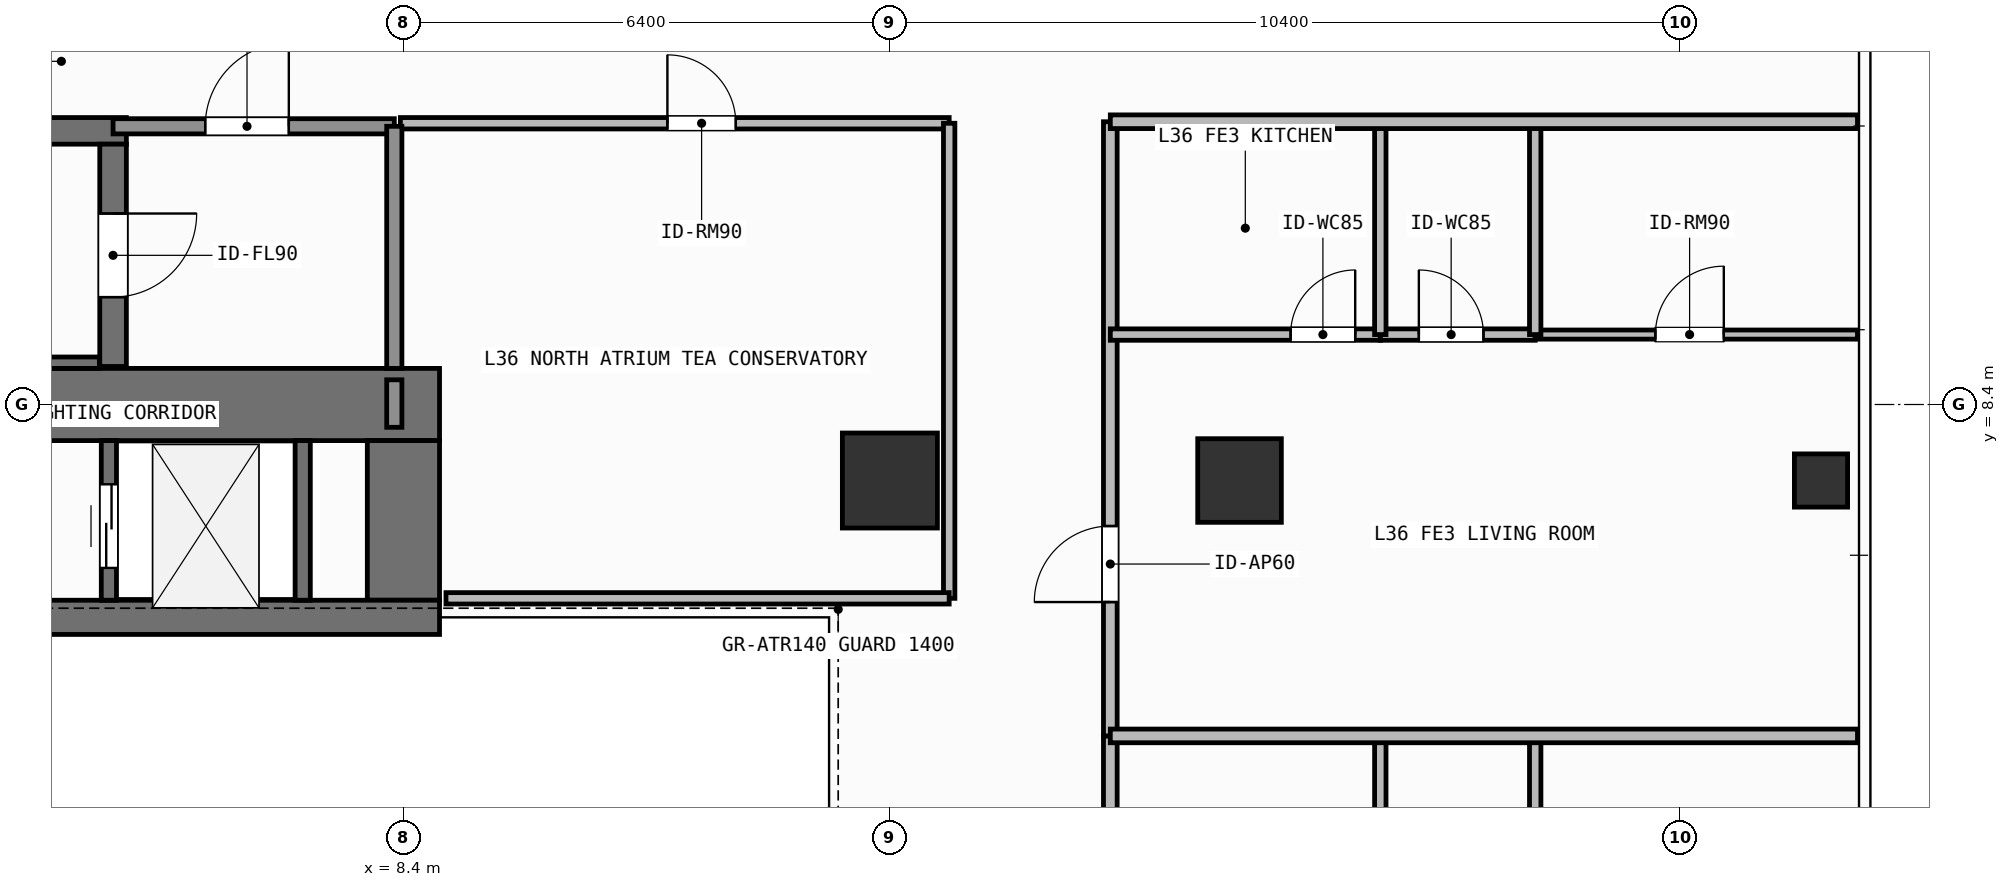
"""IFC4 building model, lengths in metres.
Left out: names, types, materials, properties, quantities, classifications, styles, units other than length and angle.
Written with IfcOpenShell. Run it as: python <this file> out.ifc"""

import sys

from ifc_helpers import new_model, si_unit, direction, frame, frame_2d, origin, origin_2d, place, context, subcontext, project, spatial, rectangle, hollow_rectangle, extrude, element, fill, save


model = new_model("IFC4")
c1 = context("Model", 3, precision=1e-05, world=origin(), true_north=direction((0.0, 1.0)))
c2 = subcontext(c1, "Body", "Model", "MODEL_VIEW")
j1 = project(units=[si_unit("LENGTHUNIT", "METRE"), si_unit("PLANEANGLEUNIT", "RADIAN")], contexts=[c1])
p1 = place(None, origin())
s1 = spatial("IfcSite", under=j1, at=p1, CompositionType="ELEMENT")
p2 = place(p1, origin())
s2 = spatial("IfcBuilding", under=s1, at=p2, CompositionType="ELEMENT")
p3 = place(p2, frame((0.0, 0.0, 144.6)))
s3 = spatial("IfcBuildingStorey", under=s2, at=p3, CompositionType="ELEMENT", Elevation=144.6)
p4 = place(p3, frame((-7.55, 8.4, 0.0), z_axis=(0.0, 0.0, 1.0), x_axis=(1.0, 0.0, 0.0)))
e1 = element("IfcWall", 1, at=p4, inside=s3, PredefinedType="SHEAR", context=c2, shape_type="SweptSolid", body=[
    extrude(rectangle(XDim=16.425, YDim=0.95, at=frame_2d((8.212, 0.0))), origin(), (0.0, 0.0, 1.0), 3.9),
])
p5 = place(p3, frame((8.4, 5.825, 0.0), z_axis=(0.0, 0.0, 1.0), x_axis=(0.0, 1.0, 0.0)))
e2 = element("IfcWall", 2, at=p5, inside=s3, PredefinedType="SHEAR", context=c2, shape_type="SweptSolid", body=[
    extrude(rectangle(XDim=2.1, YDim=0.95, at=frame_2d((1.05, 0.0))), origin(), (0.0, 0.0, 1.0), 3.9),
])
p6 = place(p3, frame((3.045, 5.6, 0.0), z_axis=(0.0, 0.0, 1.0), x_axis=(1.0, 0.0, 0.0)))
e3 = element("IfcWall", 3, at=p6, inside=s3, PredefinedType="SHEAR", context=c2, shape_type="SweptSolid", body=[
    extrude(rectangle(XDim=5.83, YDim=0.45, at=frame_2d((2.915, 0.0))), origin(), (0.0, 0.0, 1.0), 3.9),
])
p7 = place(p3, frame((-2.555, 12.0, 0.0), z_axis=(0.0, 0.0, 1.0), x_axis=(1.0, 0.0, 0.0)))
e4 = element("IfcWall", 4, at=p7, inside=s3, PredefinedType="SHEAR", context=c2, shape_type="SweptSolid", body=[
    extrude(rectangle(XDim=7.31, YDim=0.35, at=frame_2d((3.655, 0.0))), origin(), (0.0, 0.0, 1.0), 3.9),
])
p8 = place(p3, frame((-2.2, 8.95, 0.0), z_axis=(0.0, 0.0, 1.0), x_axis=(1.0, 0.0, 0.0)))
e5 = element("IfcWall", 5, at=p8, inside=s3, PredefinedType="SHEAR", context=c2, shape_type="SweptSolid", body=[
    extrude(rectangle(XDim=6.6, YDim=0.15, at=frame_2d((3.3, 0.0))), origin(), (0.0, 0.0, 1.0), 3.9),
])
p9 = place(p3, frame((4.58, 11.825, 0.0), z_axis=(0.0, 0.0, 1.0), x_axis=(0.0, -1.0, 0.0)))
e6 = element("IfcWall", 6, at=p9, inside=s3, PredefinedType="SHEAR", context=c2, shape_type="SweptSolid", body=[
    extrude(rectangle(XDim=2.925, YDim=0.35, at=frame_2d((1.462, 0.0))), origin(), (0.0, 0.0, 1.0), 3.9),
])
p10 = place(p9, frame((0.913, 0.0, 0.0)))
e7 = element("IfcOpeningElement", 7, at=p10, cuts=e6, PredefinedType="OPENING", context=c2, shape_type="SweptSolid", body=[
    extrude(rectangle(XDim=1.1, YDim=2.15, at=frame_2d((0.55, 1.075))), frame((0.0, 0.185, 0.0), z_axis=(0.0, -1.0, 0.0), x_axis=(1.0, 0.0, 0.0)), (0.0, 0.0, 1.0), 0.37),
])
p11 = place(p3, frame((14.8, 7.4, 0.0), z_axis=(0.0, 0.0, 1.0), x_axis=(1.0, 0.0, 0.0)))
e8 = element("IfcColumn", 8, at=p11, inside=s3, PredefinedType="COLUMN", context=c2, shape_type="SweptSolid", body=[
    extrude(rectangle(XDim=1.25, YDim=1.25, at=origin_2d()), origin(), (0.0, 0.0, 1.0), 3.9),
])
p12 = place(p3, frame((19.4, 7.4, 0.0), z_axis=(0.0, 0.0, 1.0), x_axis=(1.0, 0.0, 0.0)))
e9 = element("IfcColumn", 9, at=p12, inside=s3, PredefinedType="COLUMN", context=c2, shape_type="SweptSolid", body=[
    extrude(rectangle(XDim=1.1, YDim=1.1, at=origin_2d()), origin(), (0.0, 0.0, 1.0), 3.9),
])
p13 = place(p3, frame((27.05, 7.4, 0.0), z_axis=(0.0, 0.0, 1.0), x_axis=(1.0, 0.0, 0.0)))
e10 = element("IfcColumn", 10, at=p13, inside=s3, PredefinedType="COLUMN", context=c2, shape_type="SweptSolid", body=[
    extrude(hollow_rectangle(XDim=0.7, YDim=0.7, WallThickness=0.032, at=origin_2d()), origin(), (0.0, 0.0, 1.0), 3.9),
])
p14 = place(p3, frame((4.525, 5.825, 0.0), z_axis=(0.0, 0.0, 1.0), x_axis=(0.0, 1.0, 0.0)))
e11 = element("IfcWall", 11, at=p14, inside=s3, PredefinedType="SHEAR", context=c2, shape_type="SweptSolid", body=[
    extrude(rectangle(XDim=2.1, YDim=0.2, at=frame_2d((1.05, 0.0))), origin(), (0.0, 0.0, 1.0), 3.68),
])
p15 = place(p14, frame((0.425, 0.0, 0.0)))
e12 = element("IfcOpeningElement", 12, at=p15, cuts=e11, PredefinedType="OPENING", context=c2, shape_type="SweptSolid", body=[
    extrude(rectangle(XDim=1.1, YDim=2.2, at=frame_2d((0.55, 1.1))), frame((0.0, 0.11, 0.0), z_axis=(0.0, -1.0, 0.0), x_axis=(1.0, 0.0, 0.0)), (0.0, 0.0, 1.0), 0.22),
])
p16 = place(p3, frame((7.075, 5.825, 0.0), z_axis=(0.0, 0.0, 1.0), x_axis=(0.0, 1.0, 0.0)))
e13 = element("IfcWall", 13, at=p16, inside=s3, PredefinedType="SHEAR", context=c2, shape_type="SweptSolid", body=[
    extrude(rectangle(XDim=2.1, YDim=0.2, at=frame_2d((1.05, 0.0))), origin(), (0.0, 0.0, 1.0), 3.68),
])
p17 = place(p3, frame((4.58, 12.06, 0.0), z_axis=(0.0, 0.0, 1.0), x_axis=(1.0, 0.0, 0.0)))
e14 = element("IfcWall", 14, at=p17, inside=s3, PredefinedType="SOLIDWALL", context=c2, shape_type="SweptSolid", body=[
    extrude(rectangle(XDim=3.7, YDim=0.2, at=frame_2d((1.85, 0.0))), origin(), (0.0, 0.0, 1.0), 3.68),
])
p18 = place(p17, frame((1.212, 0.0, 0.0)))
e15 = element("IfcOpeningElement", 15, at=p18, cuts=e14, PredefinedType="OPENING", context=c2, shape_type="SweptSolid", body=[
    extrude(rectangle(XDim=1.1, YDim=2.15, at=frame_2d((0.55, 1.075))), frame((0.0, 0.11, 0.0), z_axis=(0.0, -1.0, 0.0), x_axis=(1.0, 0.0, 0.0)), (0.0, 0.0, 1.0), 0.22),
])
p19 = place(p3, frame((8.36, 12.1, 0.0), z_axis=(0.0, 0.0, 1.0), x_axis=(1.0, 0.0, 0.0)))
e16 = element("IfcWall", 16, at=p19, inside=s3, PredefinedType="PARTITIONING", context=c2, shape_type="SweptSolid", body=[
    extrude(rectangle(XDim=7.22, YDim=0.15, at=frame_2d((3.61, 0.0))), origin(), (0.0, 0.0, 1.0), 3.68),
])
p20 = place(p19, frame((3.513, 0.0, 0.0)))
e17 = element("IfcOpeningElement", 17, at=p20, cuts=e16, PredefinedType="OPENING", context=c2, shape_type="SweptSolid", body=[
    extrude(rectangle(XDim=0.9, YDim=2.1, at=frame_2d((0.45, 1.05))), frame((0.0, 0.085, 0.0), z_axis=(0.0, -1.0, 0.0), x_axis=(1.0, 0.0, 0.0)), (0.0, 0.0, 1.0), 0.17),
])
p21 = place(p3, frame((17.7, -5.058, 0.0), z_axis=(0.0, 0.0, 1.0), x_axis=(0.0, 1.0, 0.0)))
e18 = element("IfcWall", 18, at=p21, inside=s3, PredefinedType="PARTITIONING", context=c2, shape_type="SweptSolid", body=[
    extrude(rectangle(XDim=9.098, YDim=0.18, at=frame_2d((4.549, 0.0))), origin(), (0.0, 0.0, 1.0), 3.68),
])
p22 = place(p21, frame((1.928, 0.0, 0.0)))
e19 = element("IfcOpeningElement", 19, at=p22, cuts=e18, PredefinedType="OPENING", context=c2, shape_type="SweptSolid", body=[
    extrude(rectangle(XDim=1.0, YDim=2.2, at=frame_2d((0.5, 1.1))), frame((0.0, 0.1, 0.0), z_axis=(0.0, -1.0, 0.0), x_axis=(1.0, 0.0, 0.0)), (0.0, 0.0, 1.0), 0.2),
])
p23 = place(p3, frame((17.7, 4.04, 0.0), z_axis=(0.0, 0.0, 1.0), x_axis=(0.0, 1.0, 0.0)))
e20 = element("IfcWall", 20, at=p23, inside=s3, PredefinedType="PARTITIONING", context=c2, shape_type="SweptSolid", body=[
    extrude(rectangle(XDim=8.08, YDim=0.18, at=frame_2d((4.04, 0.0))), origin(), (0.0, 0.0, 1.0), 3.68),
])
p24 = place(p23, frame((1.761, 0.0, 0.0)))
e21 = element("IfcOpeningElement", 21, at=p24, cuts=e20, PredefinedType="OPENING", context=c2, shape_type="SweptSolid", body=[
    extrude(rectangle(XDim=1.0, YDim=2.2, at=frame_2d((0.5, 1.1))), frame((0.0, 0.1, 0.0), z_axis=(0.0, -1.0, 0.0), x_axis=(1.0, 0.0, 0.0)), (0.0, 0.0, 1.0), 0.2),
])
p25 = place(p3, frame((17.7, 9.32, 0.0), z_axis=(0.0, 0.0, 1.0), x_axis=(1.0, 0.0, 0.0)))
e22 = element("IfcWall", 22, at=p25, inside=s3, PredefinedType="PARTITIONING", context=c2, shape_type="SweptSolid", body=[
    extrude(rectangle(XDim=3.552, YDim=0.15, at=frame_2d((1.776, 0.0))), origin(), (0.0, 0.0, 1.0), 3.68),
])
p26 = place(p25, frame((2.372, 0.0, 0.0)))
e23 = element("IfcOpeningElement", 23, at=p26, cuts=e22, PredefinedType="OPENING", context=c2, shape_type="SweptSolid", body=[
    extrude(rectangle(XDim=0.85, YDim=2.1, at=frame_2d((0.425, 1.05))), frame((0.0, 0.085, 0.0), z_axis=(0.0, -1.0, 0.0), x_axis=(1.0, 0.0, 0.0)), (0.0, 0.0, 1.0), 0.17),
])
p27 = place(p3, frame((21.252, 9.32, 0.0), z_axis=(0.0, 0.0, 1.0), x_axis=(1.0, 0.0, 0.0)))
e24 = element("IfcWall", 24, at=p27, inside=s3, PredefinedType="PARTITIONING", context=c2, shape_type="SweptSolid", body=[
    extrude(rectangle(XDim=2.038, YDim=0.15, at=frame_2d((1.019, 0.0))), origin(), (0.0, 0.0, 1.0), 3.68),
])
p28 = place(p27, frame((0.507, 0.0, 0.0)))
e25 = element("IfcOpeningElement", 25, at=p28, cuts=e24, PredefinedType="OPENING", context=c2, shape_type="SweptSolid", body=[
    extrude(rectangle(XDim=0.85, YDim=2.1, at=frame_2d((0.425, 1.05))), frame((0.0, 0.085, 0.0), z_axis=(0.0, -1.0, 0.0), x_axis=(1.0, 0.0, 0.0)), (0.0, 0.0, 1.0), 0.17),
])
p29 = place(p3, frame((23.29, 9.32, 0.0), z_axis=(0.0, 0.0, 1.0), x_axis=(1.0, 0.0, 0.0)))
e26 = element("IfcWall", 26, at=p29, inside=s3, PredefinedType="PARTITIONING", context=c2, shape_type="SweptSolid", body=[
    extrude(rectangle(XDim=4.24, YDim=0.12, at=frame_2d((2.12, 0.0))), origin(), (0.0, 0.0, 1.0), 3.68),
])
p30 = place(p29, frame((1.581, 0.0, 0.0)))
e27 = element("IfcOpeningElement", 27, at=p30, cuts=e26, PredefinedType="OPENING", context=c2, shape_type="SweptSolid", body=[
    extrude(rectangle(XDim=0.9, YDim=2.1, at=frame_2d((0.45, 1.05))), frame((0.0, 0.07, 0.0), z_axis=(0.0, -1.0, 0.0), x_axis=(1.0, 0.0, 0.0)), (0.0, 0.0, 1.0), 0.14),
])
p31 = place(p3, frame((8.28, 8.875, 0.0), z_axis=(0.0, 0.0, 1.0), x_axis=(0.0, 1.0, 0.0)))
e28 = element("IfcWall", 28, at=p31, inside=s3, PredefinedType="SOLIDWALL", context=c2, shape_type="SweptSolid", body=[
    extrude(rectangle(XDim=3.185, YDim=0.2, at=frame_2d((1.593, 0.0))), origin(), (0.0, 0.0, 1.0), 3.68),
])
p32 = place(p3, frame((8.28, 8.1, 0.0), z_axis=(0.0, 0.0, 1.0), x_axis=(0.0, 1.0, 0.0)))
e29 = element("IfcWall", 29, at=p32, inside=s3, PredefinedType="SOLIDWALL", context=c2, shape_type="SweptSolid", body=[
    extrude(rectangle(XDim=0.625, YDim=0.2, at=frame_2d((0.312, 0.0))), origin(), (0.0, 0.0, 1.0), 3.68),
])
p33 = place(p3, frame((15.58, 5.85, 0.0), z_axis=(0.0, 0.0, 1.0), x_axis=(0.0, 1.0, 0.0)))
e30 = element("IfcWall", 30, at=p33, inside=s3, PredefinedType="PARTITIONING", context=c2, shape_type="SweptSolid", body=[
    extrude(rectangle(XDim=6.25, YDim=0.15, at=frame_2d((3.125, 0.0))), origin(), (0.0, 0.0, 1.0), 3.68),
])
p34 = place(p3, frame((8.96, 5.85, 0.0), z_axis=(0.0, 0.0, 1.0), x_axis=(1.0, 0.0, 0.0)))
e31 = element("IfcWall", 31, at=p34, inside=s3, PredefinedType="PARTITIONING", context=c2, shape_type="SweptSolid", body=[
    extrude(rectangle(XDim=6.62, YDim=0.15, at=frame_2d((3.31, 0.0))), origin(), (0.0, 0.0, 1.0), 3.68),
])
for number, where, z_axis, x_axis in (
    (32, (21.252, -0.873, 0.0), (0.0, 0.0, 1.0), (0.0, 1.0, 0.0)),
    (33, (23.29, -0.873, 0.0), (0.0, 0.0, 1.0), (0.0, 1.0, 0.0)),
):
    element("IfcWall", number, at=place(p3, frame(where, z_axis=z_axis, x_axis=x_axis)), inside=s3, PredefinedType="PARTITIONING", context=c2, shape_type="SweptSolid", body=[
        extrude(rectangle(XDim=4.913, YDim=0.15, at=frame_2d((2.457, 0.0))), origin(), (0.0, 0.0, 1.0), 3.68),
    ])
for number, where, z_axis, x_axis in (
    (34, (21.252, 9.32, 0.0), (0.0, 0.0, 1.0), (0.0, 1.0, 0.0)),
    (35, (23.29, 9.32, 0.0), (0.0, 0.0, 1.0), (0.0, 1.0, 0.0)),
):
    element("IfcWall", number, at=place(p3, frame(where, z_axis=z_axis, x_axis=x_axis)), inside=s3, PredefinedType="PARTITIONING", context=c2, shape_type="SweptSolid", body=[
        extrude(rectangle(XDim=2.8, YDim=0.15, at=frame_2d((1.4, 0.0))), origin(), (0.0, 0.0, 1.0), 3.68),
    ])
for number, where, z_axis, x_axis in (
    (36, (17.7, 4.04, 0.0), (0.0, 0.0, 1.0), (1.0, 0.0, 0.0)),
    (37, (17.7, 12.12, 0.0), (0.0, 0.0, 1.0), (1.0, 0.0, 0.0)),
):
    element("IfcWall", number, at=place(p3, frame(where, z_axis=z_axis, x_axis=x_axis)), inside=s3, PredefinedType="PARTITIONING", context=c2, shape_type="SweptSolid", body=[
        extrude(rectangle(XDim=9.83, YDim=0.18, at=frame_2d((4.915, 0.0))), origin(), (0.0, 0.0, 1.0), 3.68),
    ])
p35 = place(p15, origin())
e38 = element("IfcDoor", 38, at=p35, inside=s3, OperationType="SLIDING_TO_LEFT", PredefinedType="DOOR", context=c2, shape_type="SweptSolid", body=[
    extrude(rectangle(XDim=1.1, YDim=2.2, at=frame_2d((0.55, 1.1))), frame((0.0, 0.025, 0.0), z_axis=(0.0, -1.0, 0.0), x_axis=(1.0, 0.0, 0.0)), (0.0, 0.0, 1.0), 0.05),
])
fill(e12, e38)
p36 = place(p10, origin())
e39 = element("IfcDoor", 39, at=p36, inside=s3, OperationType="SINGLE_SWING_LEFT", PredefinedType="DOOR", context=c2, shape_type="SweptSolid", body=[
    extrude(rectangle(XDim=1.1, YDim=2.15, at=frame_2d((0.55, 1.075))), frame((0.0, 0.025, 0.0), z_axis=(0.0, -1.0, 0.0), x_axis=(1.0, 0.0, 0.0)), (0.0, 0.0, 1.0), 0.05),
])
fill(e7, e39)
p37 = place(p18, origin())
e40 = element("IfcDoor", 40, at=p37, inside=s3, OperationType="SINGLE_SWING_RIGHT", PredefinedType="DOOR", context=c2, shape_type="SweptSolid", body=[
    extrude(rectangle(XDim=1.1, YDim=2.15, at=frame_2d((0.55, 1.075))), frame((0.0, 0.025, 0.0), z_axis=(0.0, -1.0, 0.0), x_axis=(1.0, 0.0, 0.0)), (0.0, 0.0, 1.0), 0.05),
])
fill(e15, e40)
p38 = place(p20, origin())
e41 = element("IfcDoor", 41, at=p38, inside=s3, OperationType="SINGLE_SWING_LEFT", PredefinedType="DOOR", context=c2, shape_type="SweptSolid", body=[
    extrude(rectangle(XDim=0.9, YDim=2.1, at=frame_2d((0.45, 1.05))), frame((0.0, 0.025, 0.0), z_axis=(0.0, -1.0, 0.0), x_axis=(1.0, 0.0, 0.0)), (0.0, 0.0, 1.0), 0.05),
])
fill(e17, e41)
p39 = place(p24, origin())
e42 = element("IfcDoor", 42, at=p39, inside=s3, OperationType="SINGLE_SWING_LEFT", PredefinedType="DOOR", context=c2, shape_type="SweptSolid", body=[
    extrude(rectangle(XDim=1.0, YDim=2.2, at=frame_2d((0.5, 1.1))), frame((0.0, 0.025, 0.0), z_axis=(0.0, -1.0, 0.0), x_axis=(1.0, 0.0, 0.0)), (0.0, 0.0, 1.0), 0.05),
])
fill(e21, e42)
p40 = place(p26, origin())
e43 = element("IfcDoor", 43, at=p40, inside=s3, OperationType="SINGLE_SWING_RIGHT", PredefinedType="DOOR", context=c2, shape_type="SweptSolid", body=[
    extrude(rectangle(XDim=0.85, YDim=2.1, at=frame_2d((0.425, 1.05))), frame((0.0, 0.025, 0.0), z_axis=(0.0, -1.0, 0.0), x_axis=(1.0, 0.0, 0.0)), (0.0, 0.0, 1.0), 0.05),
])
fill(e23, e43)
p41 = place(p28, origin())
e44 = element("IfcDoor", 44, at=p41, inside=s3, OperationType="SINGLE_SWING_LEFT", PredefinedType="DOOR", context=c2, shape_type="SweptSolid", body=[
    extrude(rectangle(XDim=0.85, YDim=2.1, at=frame_2d((0.425, 1.05))), frame((0.0, 0.025, 0.0), z_axis=(0.0, -1.0, 0.0), x_axis=(1.0, 0.0, 0.0)), (0.0, 0.0, 1.0), 0.05),
])
fill(e25, e44)
p42 = place(p30, origin())
e45 = element("IfcDoor", 45, at=p42, inside=s3, OperationType="SINGLE_SWING_RIGHT", PredefinedType="DOOR", context=c2, shape_type="SweptSolid", body=[
    extrude(rectangle(XDim=0.9, YDim=2.1, at=frame_2d((0.45, 1.05))), frame((0.0, 0.025, 0.0), z_axis=(0.0, -1.0, 0.0), x_axis=(1.0, 0.0, 0.0)), (0.0, 0.0, 1.0), 0.05),
])
fill(e27, e45)
save(model, sys.argv[1])
